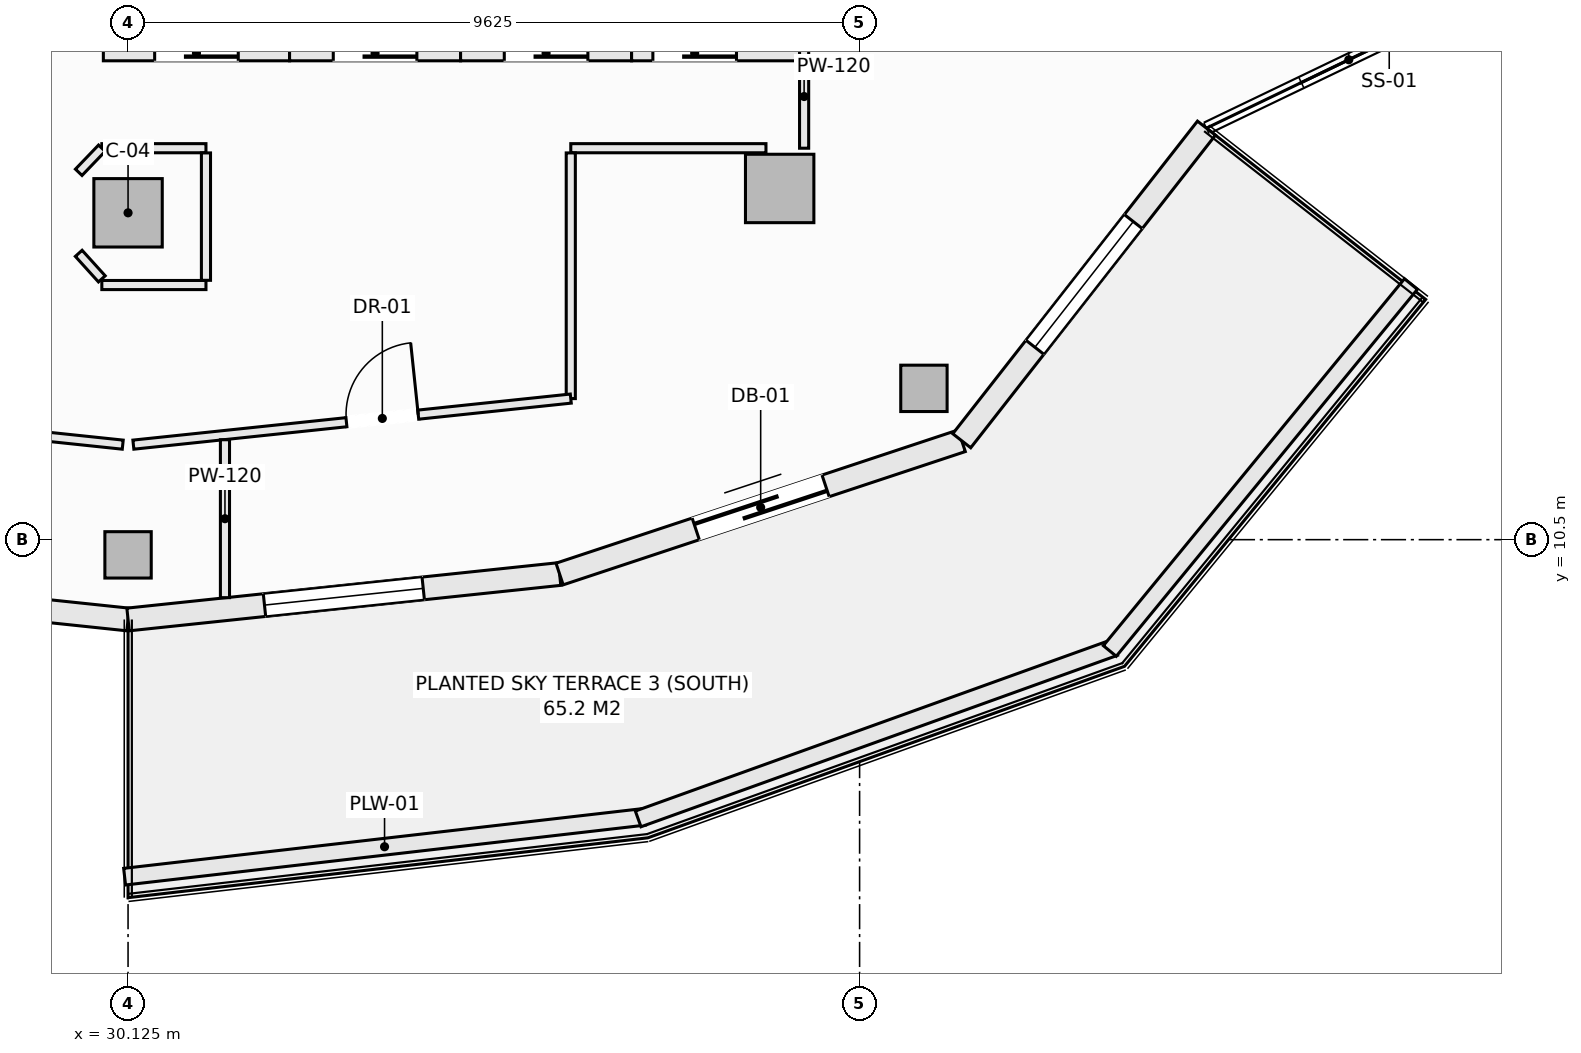
"""IFC4 building model, lengths in metres.
Left out: names, types, materials, properties, quantities, classifications, styles, units other than length and angle.
Written with IfcOpenShell. Run it as: python <this file> out.ifc"""

import sys

from ifc_helpers import new_model, si_unit, direction, frame, frame_2d, origin, origin_2d, place, context, subcontext, project, spatial, rectangle, hollow_rectangle, extrude, element, fill, save


model = new_model("IFC4")
c1 = context("Model", 3, precision=1e-05, world=origin(), true_north=direction((0.0, 1.0)))
c2 = subcontext(c1, "Body", "Model", "MODEL_VIEW")
j1 = project(units=[si_unit("LENGTHUNIT", "METRE"), si_unit("PLANEANGLEUNIT", "RADIAN")], contexts=[c1])
p1 = place(None, origin())
s1 = spatial("IfcSite", under=j1, at=p1, CompositionType="ELEMENT")
p2 = place(p1, origin())
s2 = spatial("IfcBuilding", under=s1, at=p2, CompositionType="ELEMENT")
p3 = place(p2, frame((0.0, 0.0, 183.5)))
s3 = spatial("IfcBuildingStorey", under=s2, at=p3, CompositionType="ELEMENT", Elevation=183.5)
for number, where, z_axis, x_axis in (
    (1, (30.125, 10.3, -0.27), (0.0, 0.0, 1.0), (1.0, 0.0, 0.0)),
    (2, (40.596, 12.49, -0.27), (0.0, 0.0, 1.0), (1.0, 0.0, 0.0)),
):
    element("IfcColumn", number, at=place(p3, frame(where, z_axis=z_axis, x_axis=x_axis)), inside=s3, PredefinedType="COLUMN", context=c2, shape_type="SweptSolid", body=[
        extrude(hollow_rectangle(XDim=0.61, YDim=0.61, WallThickness=0.025, at=origin_2d()), origin(), (0.0, 0.0, 1.0), 3.35),
    ])
for number, where, z_axis, x_axis in (
    (3, (30.125, 14.8, -0.27), (0.0, 0.0, 1.0), (1.0, 0.0, 0.0)),
    (4, (38.698, 15.121, -0.27), (0.0, 0.0, 1.0), (1.0, 0.0, 0.0)),
):
    element("IfcColumn", number, at=place(p3, frame(where, z_axis=z_axis, x_axis=x_axis)), inside=s3, PredefinedType="COLUMN", context=c2, shape_type="SweptSolid", body=[
        extrude(rectangle(XDim=0.9, YDim=0.9, at=origin_2d()), origin(), (0.0, 0.0, 1.0), 3.35),
    ])
p4 = place(p3, frame((24.447, 10.048, 0.0), z_axis=(0.0, 0.0, 1.0), x_axis=(0.994496545245, -0.104769372887, 0.0)))
e5 = element("IfcWall", 5, at=p4, inside=s3, PredefinedType="SOLIDWALL", context=c2, shape_type="SweptSolid", body=[
    extrude(rectangle(XDim=5.709, YDim=0.3, at=frame_2d((2.854, 0.0))), origin(), (0.0, 0.0, 1.0), 2.603),
])
p5 = place(p4, frame((1.805, 0.0, 0.74)))
e6 = element("IfcOpeningElement", 6, at=p5, cuts=e5, PredefinedType="OPENING", context=c2, shape_type="SweptSolid", body=[
    extrude(rectangle(XDim=2.1, YDim=1.7, at=frame_2d((1.05, 0.85))), frame((0.0, 0.16, 0.0), z_axis=(0.0, -1.0, 0.0), x_axis=(1.0, 0.0, 0.0)), (0.0, 0.0, 1.0), 0.32),
])
p6 = place(p3, frame((30.125, 9.45, 0.0), z_axis=(0.0, 0.0, 1.0), x_axis=(0.994496545245, 0.104769372887, 0.0)))
e7 = element("IfcWall", 7, at=p6, inside=s3, PredefinedType="SOLIDWALL", context=c2, shape_type="SweptSolid", body=[
    extrude(rectangle(XDim=5.709, YDim=0.3, at=frame_2d((2.854, 0.0))), origin(), (0.0, 0.0, 1.0), 2.603),
])
p7 = place(p6, frame((1.805, 0.0, 0.74)))
e8 = element("IfcOpeningElement", 8, at=p7, cuts=e7, PredefinedType="OPENING", context=c2, shape_type="SweptSolid", body=[
    extrude(rectangle(XDim=2.1, YDim=1.7, at=frame_2d((1.05, 0.85))), frame((0.0, 0.16, 0.0), z_axis=(0.0, -1.0, 0.0), x_axis=(1.0, 0.0, 0.0)), (0.0, 0.0, 1.0), 0.32),
])
p8 = place(p3, frame((35.803, 10.048, 0.0), z_axis=(0.0, 0.0, 1.0), x_axis=(0.949246811547, 0.314532177636, 0.0)))
e9 = element("IfcWall", 9, at=p8, inside=s3, PredefinedType="SOLIDWALL", context=c2, shape_type="SweptSolid", body=[
    extrude(rectangle(XDim=5.574, YDim=0.3, at=frame_2d((2.787, 0.0))), origin(), (0.0, 0.0, 1.0), 2.603),
])
p9 = place(p8, frame((1.887, 0.0, 0.0)))
e10 = element("IfcOpeningElement", 10, at=p9, cuts=e9, PredefinedType="OPENING", context=c2, shape_type="SweptSolid", body=[
    extrude(rectangle(XDim=1.8, YDim=2.25, at=frame_2d((0.9, 1.125))), frame((0.0, 0.16, 0.0), z_axis=(0.0, -1.0, 0.0), x_axis=(1.0, 0.0, 0.0)), (0.0, 0.0, 1.0), 0.32),
])
p10 = place(p3, frame((41.094, 11.801, 0.0), z_axis=(0.0, 0.0, 1.0), x_axis=(0.616429245738, 0.787410302828, 0.0)))
e11 = element("IfcWall", 11, at=p10, inside=s3, PredefinedType="SOLIDWALL", context=c2, shape_type="SweptSolid", body=[
    extrude(rectangle(XDim=5.223, YDim=0.3, at=frame_2d((2.612, 0.0))), origin(), (0.0, 0.0, 1.0), 2.603),
])
p11 = place(p10, frame((1.562, 0.0, 0.74)))
e12 = element("IfcOpeningElement", 12, at=p11, cuts=e11, PredefinedType="OPENING", context=c2, shape_type="SweptSolid", body=[
    extrude(rectangle(XDim=2.1, YDim=1.7, at=frame_2d((1.05, 0.85))), frame((0.0, 0.16, 0.0), z_axis=(0.0, -1.0, 0.0), x_axis=(1.0, 0.0, 0.0)), (0.0, 0.0, 1.0), 0.32),
])
p12 = place(p3, frame((30.08, 6.066, 0.0), z_axis=(0.0, 0.0, 1.0), x_axis=(0.993440576506, 0.114349555972, 0.0)))
e13 = element("IfcWall", 13, at=p12, inside=s3, PredefinedType="PARAPET", context=c2, shape_type="SweptSolid", body=[
    extrude(rectangle(XDim=6.885, YDim=0.22, at=frame_2d((3.443, 0.0))), origin(), (0.0, 0.0, 1.0), 0.52),
])
p13 = place(p3, frame((36.837, 6.826, 0.0), z_axis=(0.0, 0.0, 1.0), x_axis=(0.940948576924, 0.338549517184, 0.0)))
e14 = element("IfcWall", 14, at=p13, inside=s3, PredefinedType="PARAPET", context=c2, shape_type="SweptSolid", body=[
    extrude(rectangle(XDim=6.664, YDim=0.22, at=frame_2d((3.332, 0.0))), origin(), (0.0, 0.0, 1.0), 0.52),
])
p14 = place(p3, frame((43.042, 9.036, 0.0), z_axis=(0.0, 0.0, 1.0), x_axis=(0.634429234628, 0.77298094818, 0.0)))
e15 = element("IfcWall", 15, at=p14, inside=s3, PredefinedType="PARAPET", context=c2, shape_type="SweptSolid", body=[
    extrude(rectangle(XDim=6.245, YDim=0.22, at=frame_2d((3.123, 0.0))), origin(), (0.0, 0.0, 1.0), 0.52),
])
p15 = place(p3, frame((29.8, 16.9, 0.0), z_axis=(0.0, 0.0, 1.0), x_axis=(1.0, 0.0, 0.0)))
e16 = element("IfcWall", 16, at=p15, inside=s3, PredefinedType="SOLIDWALL", context=c2, shape_type="SweptSolid", body=[
    extrude(rectangle(XDim=2.45, YDim=0.2, at=frame_2d((1.225, 0.0))), origin(), (0.0, 0.0, 1.0), 3.08),
])
p16 = place(p15, frame((0.675, 0.0, 0.0)))
e17 = element("IfcOpeningElement", 17, at=p16, cuts=e16, PredefinedType="OPENING", context=c2, shape_type="SweptSolid", body=[
    extrude(rectangle(XDim=1.1, YDim=2.2, at=frame_2d((0.55, 1.1))), frame((0.0, 0.11, 0.0), z_axis=(0.0, -1.0, 0.0), x_axis=(1.0, 0.0, 0.0)), (0.0, 0.0, 1.0), 0.22),
])
p17 = place(p3, frame((32.25, 16.9, 0.0), z_axis=(0.0, 0.0, 1.0), x_axis=(1.0, 0.0, 0.0)))
e18 = element("IfcWall", 18, at=p17, inside=s3, PredefinedType="SOLIDWALL", context=c2, shape_type="SweptSolid", body=[
    extrude(rectangle(XDim=2.25, YDim=0.2, at=frame_2d((1.125, 0.0))), origin(), (0.0, 0.0, 1.0), 3.08),
])
p18 = place(p17, frame((0.575, 0.0, 0.0)))
e19 = element("IfcOpeningElement", 19, at=p18, cuts=e18, PredefinedType="OPENING", context=c2, shape_type="SweptSolid", body=[
    extrude(rectangle(XDim=1.1, YDim=2.2, at=frame_2d((0.55, 1.1))), frame((0.0, 0.11, 0.0), z_axis=(0.0, -1.0, 0.0), x_axis=(1.0, 0.0, 0.0)), (0.0, 0.0, 1.0), 0.22),
])
p19 = place(p3, frame((34.5, 16.9, 0.0), z_axis=(0.0, 0.0, 1.0), x_axis=(1.0, 0.0, 0.0)))
e20 = element("IfcWall", 20, at=p19, inside=s3, PredefinedType="SOLIDWALL", context=c2, shape_type="SweptSolid", body=[
    extrude(rectangle(XDim=2.25, YDim=0.2, at=frame_2d((1.125, 0.0))), origin(), (0.0, 0.0, 1.0), 3.08),
])
p20 = place(p19, frame((0.575, 0.0, 0.0)))
e21 = element("IfcOpeningElement", 21, at=p20, cuts=e20, PredefinedType="OPENING", context=c2, shape_type="SweptSolid", body=[
    extrude(rectangle(XDim=1.1, YDim=2.2, at=frame_2d((0.55, 1.1))), frame((0.0, 0.11, 0.0), z_axis=(0.0, -1.0, 0.0), x_axis=(1.0, 0.0, 0.0)), (0.0, 0.0, 1.0), 0.22),
])
p21 = place(p3, frame((36.75, 16.9, 0.0), z_axis=(0.0, 0.0, 1.0), x_axis=(1.0, 0.0, 0.0)))
e22 = element("IfcWall", 22, at=p21, inside=s3, PredefinedType="SOLIDWALL", context=c2, shape_type="SweptSolid", body=[
    extrude(rectangle(XDim=2.25, YDim=0.2, at=frame_2d((1.125, 0.0))), origin(), (0.0, 0.0, 1.0), 3.08),
])
p22 = place(p21, frame((0.28, 0.0, 0.0)))
e23 = element("IfcOpeningElement", 23, at=p22, cuts=e22, PredefinedType="OPENING", context=c2, shape_type="SweptSolid", body=[
    extrude(rectangle(XDim=1.1, YDim=2.2, at=frame_2d((0.55, 1.1))), frame((0.0, 0.11, 0.0), z_axis=(0.0, -1.0, 0.0), x_axis=(1.0, 0.0, 0.0)), (0.0, 0.0, 1.0), 0.22),
])
p23 = place(p3, frame((39.02, 15.65, 0.0), z_axis=(0.0, 0.0, 1.0), x_axis=(0.0, 1.0, 0.0)))
e24 = element("IfcWall", 24, at=p23, inside=s3, PredefinedType="PARTITIONING", context=c2, shape_type="SweptSolid", body=[
    extrude(rectangle(XDim=1.36, YDim=0.12, at=frame_2d((0.68, 0.0))), origin(), (0.0, 0.0, 1.0), 2.455),
])
p24 = place(p3, frame((29.78, 15.65, 0.0), z_axis=(0.0, 0.0, 1.0), x_axis=(1.0, 0.0, 0.0)))
e25 = element("IfcWall", 25, at=p24, inside=s3, PredefinedType="PARTITIONING", context=c2, shape_type="SweptSolid", body=[
    extrude(rectangle(XDim=1.37, YDim=0.12, at=frame_2d((0.685, 0.0))), origin(), (0.0, 0.0, 1.0), 3.08),
])
p25 = place(p3, frame((35.95, 15.65, 0.0), z_axis=(0.0, 0.0, 1.0), x_axis=(1.0, 0.0, 0.0)))
e26 = element("IfcWall", 26, at=p25, inside=s3, PredefinedType="PARTITIONING", context=c2, shape_type="SweptSolid", body=[
    extrude(rectangle(XDim=2.568, YDim=0.12, at=frame_2d((1.284, 0.0))), origin(), (0.0, 0.0, 1.0), 3.08),
])
p26 = place(p3, frame((35.95, 12.356, 0.0), z_axis=(0.0, 0.0, 1.0), x_axis=(0.0, 1.0, 0.0)))
e27 = element("IfcWall", 27, at=p26, inside=s3, PredefinedType="PARTITIONING", context=c2, shape_type="SweptSolid", body=[
    extrude(rectangle(XDim=3.232, YDim=0.12, at=frame_2d((1.616, 0.0))), origin(), (0.0, 0.0, 1.0), 3.08),
])
p27 = place(p3, frame((30.195, 11.75, 0.0), z_axis=(0.0, 0.0, 1.0), x_axis=(0.994502215954, 0.104715531139, 0.0)))
e28 = element("IfcWall", 28, at=p27, inside=s3, PredefinedType="PARTITIONING", context=c2, shape_type="SweptSolid", body=[
    extrude(rectangle(XDim=5.787, YDim=0.12, at=frame_2d((2.893, 0.0))), origin(), (0.0, 0.0, 1.0), 3.08),
])
p28 = place(p27, frame((2.819, 0.0, 0.0)))
e29 = element("IfcOpeningElement", 29, at=p28, cuts=e28, PredefinedType="OPENING", context=c2, shape_type="SweptSolid", body=[
    extrude(rectangle(XDim=0.95, YDim=2.1, at=frame_2d((0.475, 1.05))), frame((0.0, 0.07, 0.0), z_axis=(0.0, -1.0, 0.0), x_axis=(1.0, 0.0, 0.0)), (0.0, 0.0, 1.0), 0.14),
])
p29 = place(p3, frame((27.15, 12.056, 0.0), z_axis=(0.0, 0.0, 1.0), x_axis=(0.994501330468, -0.104723940422, 0.0)))
e30 = element("IfcWall", 30, at=p29, inside=s3, PredefinedType="PARTITIONING", context=c2, shape_type="SweptSolid", body=[
    extrude(rectangle(XDim=2.921, YDim=0.12, at=frame_2d((1.46, 0.0))), origin(), (0.0, 0.0, 1.0), 3.08),
])
p30 = place(p3, frame((29.476, 15.333, 0.0), z_axis=(0.0, 0.0, 1.0), x_axis=(0.692219273951, 0.721687243043, 0.0)))
e31 = element("IfcWall", 31, at=p30, inside=s3, PredefinedType="PARTITIONING", context=c2, shape_type="SweptSolid", body=[
    extrude(rectangle(XDim=0.439, YDim=0.12, at=frame_2d((0.22, 0.0))), origin(), (0.0, 0.0, 1.0), 3.08),
])
p31 = place(p3, frame((29.476, 14.267, 0.0), z_axis=(0.0, 0.0, 1.0), x_axis=(0.670659392016, -0.741765448037, 0.0)))
e32 = element("IfcWall", 32, at=p31, inside=s3, PredefinedType="PARTITIONING", context=c2, shape_type="SweptSolid", body=[
    extrude(rectangle(XDim=0.453, YDim=0.12, at=frame_2d((0.227, 0.0))), origin(), (0.0, 0.0, 1.0), 3.08),
])
p32 = place(p3, frame((29.78, 13.85, 0.0), z_axis=(0.0, 0.0, 1.0), x_axis=(1.0, 0.0, 0.0)))
e33 = element("IfcWall", 33, at=p32, inside=s3, PredefinedType="PARTITIONING", context=c2, shape_type="SweptSolid", body=[
    extrude(rectangle(XDim=1.37, YDim=0.12, at=frame_2d((0.685, 0.0))), origin(), (0.0, 0.0, 1.0), 3.08),
])
p33 = place(p3, frame((31.15, 13.912, 0.0), z_axis=(0.0, 0.0, 1.0), x_axis=(0.0, 1.0, 0.0)))
e34 = element("IfcWall", 34, at=p33, inside=s3, PredefinedType="PARTITIONING", context=c2, shape_type="SweptSolid", body=[
    extrude(rectangle(XDim=1.676, YDim=0.12, at=frame_2d((0.838, 0.0))), origin(), (0.0, 0.0, 1.0), 3.08),
])
p34 = place(p3, frame((31.4, 9.737, 0.0), z_axis=(0.0, 0.0, 1.0), x_axis=(0.0, 1.0, 0.0)))
e35 = element("IfcWall", 35, at=p34, inside=s3, PredefinedType="PARTITIONING", context=c2, shape_type="SweptSolid", body=[
    extrude(rectangle(XDim=2.077, YDim=0.12, at=frame_2d((1.039, 0.0))), origin(), (0.0, 0.0, 1.0), 3.08),
])
p35 = place(p7, origin())
e36 = element("IfcWindow", 36, at=p35, inside=s3, PartitioningType="SINGLE_PANEL", PredefinedType="WINDOW", context=c2, shape_type="SweptSolid", body=[
    extrude(rectangle(XDim=2.1, YDim=1.7, at=frame_2d((1.05, 0.85))), frame((0.0, 0.03, 0.0), z_axis=(0.0, -1.0, 0.0), x_axis=(1.0, 0.0, 0.0)), (0.0, 0.0, 1.0), 0.06),
])
fill(e8, e36)
p36 = place(p9, frame((1.8, 0.0, 0.0), z_axis=(0.0, 0.0, 1.0), x_axis=(-1.0, 0.0, 0.0)))
e37 = element("IfcDoor", 37, at=p36, inside=s3, OperationType="SLIDING_TO_LEFT", PredefinedType="DOOR", context=c2, shape_type="SweptSolid", body=[
    extrude(rectangle(XDim=1.8, YDim=2.25, at=frame_2d((0.9, 1.125))), frame((0.0, 0.025, 0.0), z_axis=(0.0, -1.0, 0.0), x_axis=(1.0, 0.0, 0.0)), (0.0, 0.0, 1.0), 0.05),
])
fill(e10, e37)
p37 = place(p11, origin())
e38 = element("IfcWindow", 38, at=p37, inside=s3, PartitioningType="SINGLE_PANEL", PredefinedType="WINDOW", context=c2, shape_type="SweptSolid", body=[
    extrude(rectangle(XDim=2.1, YDim=1.7, at=frame_2d((1.05, 0.85))), frame((0.0, 0.03, 0.0), z_axis=(0.0, -1.0, 0.0), x_axis=(1.0, 0.0, 0.0)), (0.0, 0.0, 1.0), 0.06),
])
fill(e12, e38)
p38 = place(p16, origin())
e39 = element("IfcDoor", 39, at=p38, inside=s3, OperationType="SLIDING_TO_LEFT", PredefinedType="DOOR", context=c2, shape_type="SweptSolid", body=[
    extrude(rectangle(XDim=1.1, YDim=2.2, at=frame_2d((0.55, 1.1))), frame((0.0, 0.025, 0.0), z_axis=(0.0, -1.0, 0.0), x_axis=(1.0, 0.0, 0.0)), (0.0, 0.0, 1.0), 0.05),
])
fill(e17, e39)
p39 = place(p18, origin())
e40 = element("IfcDoor", 40, at=p39, inside=s3, OperationType="SLIDING_TO_LEFT", PredefinedType="DOOR", context=c2, shape_type="SweptSolid", body=[
    extrude(rectangle(XDim=1.1, YDim=2.2, at=frame_2d((0.55, 1.1))), frame((0.0, 0.025, 0.0), z_axis=(0.0, -1.0, 0.0), x_axis=(1.0, 0.0, 0.0)), (0.0, 0.0, 1.0), 0.05),
])
fill(e19, e40)
p40 = place(p20, origin())
e41 = element("IfcDoor", 41, at=p40, inside=s3, OperationType="SLIDING_TO_LEFT", PredefinedType="DOOR", context=c2, shape_type="SweptSolid", body=[
    extrude(rectangle(XDim=1.1, YDim=2.2, at=frame_2d((0.55, 1.1))), frame((0.0, 0.025, 0.0), z_axis=(0.0, -1.0, 0.0), x_axis=(1.0, 0.0, 0.0)), (0.0, 0.0, 1.0), 0.05),
])
fill(e21, e41)
p41 = place(p22, origin())
e42 = element("IfcDoor", 42, at=p41, inside=s3, OperationType="SLIDING_TO_LEFT", PredefinedType="DOOR", context=c2, shape_type="SweptSolid", body=[
    extrude(rectangle(XDim=1.1, YDim=2.2, at=frame_2d((0.55, 1.1))), frame((0.0, 0.025, 0.0), z_axis=(0.0, -1.0, 0.0), x_axis=(1.0, 0.0, 0.0)), (0.0, 0.0, 1.0), 0.05),
])
fill(e23, e42)
p42 = place(p28, origin())
e43 = element("IfcDoor", 43, at=p42, inside=s3, OperationType="SINGLE_SWING_RIGHT", PredefinedType="DOOR", context=c2, shape_type="SweptSolid", body=[
    extrude(rectangle(XDim=0.95, YDim=2.1, at=frame_2d((0.475, 1.05))), frame((0.0, 0.025, 0.0), z_axis=(0.0, -1.0, 0.0), x_axis=(1.0, 0.0, 0.0)), (0.0, 0.0, 1.0), 0.05),
])
fill(e29, e43)
save(model, sys.argv[1])
